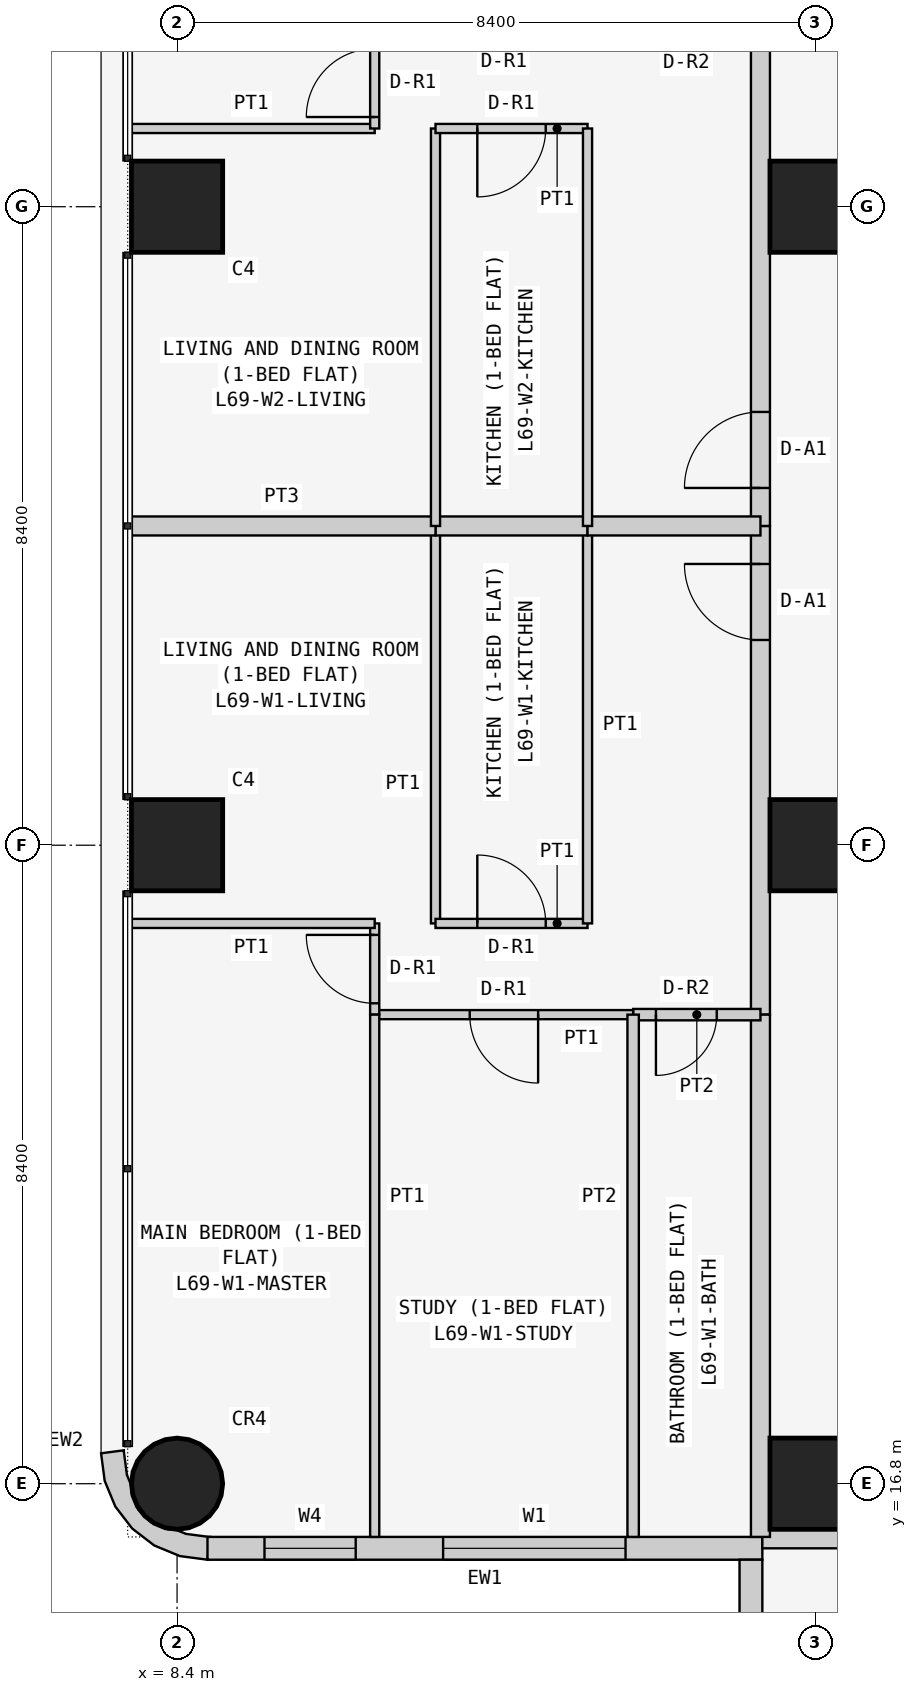
"""IFC4 building model, lengths in metres.
Left out: names, types, materials, properties, quantities, classifications, styles, units other than length and angle.
Written with IfcOpenShell. Run it as: python <this file> out.ifc"""

import sys

from ifc_helpers import new_model, si_unit, direction, frame, frame_2d, origin, origin_2d, place, context, subcontext, project, spatial, polyline, rectangle, circle, outline, extrude, element, fill, save


model = new_model("IFC4")
c1 = context("Model", 3, precision=1e-05, world=origin(), true_north=direction((0.0, 1.0)))
c2 = subcontext(c1, "Body", "Model", "MODEL_VIEW")
j1 = project(units=[si_unit("LENGTHUNIT", "METRE"), si_unit("PLANEANGLEUNIT", "RADIAN")], contexts=[c1])
p1 = place(None, origin())
s1 = spatial("IfcSite", under=j1, at=p1, CompositionType="ELEMENT")
p2 = place(p1, origin())
s2 = spatial("IfcBuilding", under=s1, at=p2, CompositionType="ELEMENT")
p3 = place(p2, frame((0.0, 0.0, 264.9)))
s3 = spatial("IfcBuildingStorey", under=s2, at=p3, CompositionType="ELEMENT", Elevation=264.9)
p4 = place(p3, frame((8.4, 16.8, 0.0), z_axis=(0.0, 0.0, 1.0), x_axis=(1.0, 0.0, 0.0)))
e1 = element("IfcColumn", 1, at=p4, inside=s3, PredefinedType="COLUMN", context=c2, shape_type="SweptSolid", body=[
    extrude(circle(Radius=0.6, at=origin_2d()), origin(), (0.0, 0.0, 1.0), 3.6),
])
for number, where, z_axis, x_axis in (
    (2, (8.4, 25.2, 0.0), (0.0, 0.0, 1.0), (1.0, 0.0, 0.0)),
    (3, (8.4, 33.6, 0.0), (0.0, 0.0, 1.0), (1.0, 0.0, 0.0)),
    (4, (16.8, 16.8, 0.0), (0.0, 0.0, 1.0), (1.0, 0.0, 0.0)),
    (5, (16.8, 25.2, 0.0), (0.0, 0.0, 1.0), (1.0, 0.0, 0.0)),
    (6, (16.8, 33.6, 0.0), (0.0, 0.0, 1.0), (1.0, 0.0, 0.0)),
):
    element("IfcColumn", number, at=place(p3, frame(where, z_axis=z_axis, x_axis=x_axis)), inside=s3, PredefinedType="COLUMN", context=c2, shape_type="SweptSolid", body=[
        extrude(rectangle(XDim=1.2, YDim=1.2, at=origin_2d()), origin(), (0.0, 0.0, 1.0), 3.6),
    ])
p5 = place(p3, frame((8.8, 15.95, 0.0), z_axis=(0.0, 0.0, 1.0), x_axis=(1.0, 0.0, 0.0)))
e7 = element("IfcWall", 7, at=p5, inside=s3, PredefinedType="SOLIDWALL", context=c2, shape_type="SweptSolid", body=[
    extrude(rectangle(XDim=7.3, YDim=0.3, at=frame_2d((3.65, 0.0))), origin(), (0.0, 0.0, 1.0), 3.45),
])
p6 = place(p5, frame((3.1, 0.0, 0.9)))
e8 = element("IfcOpeningElement", 8, at=p6, cuts=e7, PredefinedType="OPENING", context=c2, shape_type="SweptSolid", body=[
    extrude(rectangle(XDim=2.4, YDim=1.5, at=frame_2d((1.2, 0.75))), frame((0.0, 0.16, 0.0), z_axis=(0.0, -1.0, 0.0), x_axis=(1.0, 0.0, 0.0)), (0.0, 0.0, 1.0), 0.32),
])
p7 = place(p5, frame((0.75, 0.0, 0.9)))
e9 = element("IfcOpeningElement", 9, at=p7, cuts=e7, PredefinedType="OPENING", context=c2, shape_type="SweptSolid", body=[
    extrude(rectangle(XDim=1.2, YDim=1.5, at=frame_2d((0.6, 0.75))), frame((0.0, 0.16, 0.0), z_axis=(0.0, -1.0, 0.0), x_axis=(1.0, 0.0, 0.0)), (0.0, 0.0, 1.0), 0.32),
])
p8 = place(p3, frame((15.95, 15.8, 0.0), z_axis=(0.0, 0.0, 1.0), x_axis=(0.0, -1.0, 0.0)))
e10 = element("IfcWall", 10, at=p8, inside=s3, PredefinedType="SOLIDWALL", context=c2, shape_type="SweptSolid", body=[
    extrude(rectangle(XDim=7.0, YDim=0.3, at=frame_2d((3.5, 0.0))), origin(), (0.0, 0.0, 1.0), 3.45),
])
p9 = place(p8, frame((1.5, 0.0, 0.9)))
e11 = element("IfcOpeningElement", 11, at=p9, cuts=e10, PredefinedType="OPENING", context=c2, shape_type="SweptSolid", body=[
    extrude(rectangle(XDim=2.4, YDim=1.5, at=frame_2d((1.2, 0.75))), frame((0.0, 0.16, 0.0), z_axis=(0.0, -1.0, 0.0), x_axis=(1.0, 0.0, 0.0)), (0.0, 0.0, 1.0), 0.32),
])
p10 = place(p8, frame((5.05, 0.0, 0.9)))
e12 = element("IfcOpeningElement", 12, at=p10, cuts=e10, PredefinedType="OPENING", context=c2, shape_type="SweptSolid", body=[
    extrude(rectangle(XDim=1.2, YDim=1.5, at=frame_2d((0.6, 0.75))), frame((0.0, 0.16, 0.0), z_axis=(0.0, -1.0, 0.0), x_axis=(1.0, 0.0, 0.0)), (0.0, 0.0, 1.0), 0.32),
])
p11 = place(p3, frame((7.824, 17.162, 0.0), z_axis=(0.0, 0.0, 1.0), x_axis=(-0.707106781187, -0.707106781187, 0.0)))
e13 = element("IfcWall", 13, at=p11, inside=s3, PredefinedType="SOLIDWALL", context=c2, shape_type="SweptSolid", body=[
    extrude(outline(polyline([(0.047, 1.454), (0.233, 1.212), (0.292, 1.069), (0.358, 1.003), (0.449, 0.782), (0.449, 0.543), (0.358, 0.323), (0.292, 0.257), (0.233, 0.114), (0.047, -0.129), (0.033, -0.143), (0.273, -0.327), (0.495, -0.037), (0.635, 0.301), (0.683, 0.663), (0.635, 1.025), (0.495, 1.363), (0.273, 1.653), (0.033, 1.469), (0.047, 1.454)])), origin(), (0.0, 0.0, 1.0), 3.45),
])
p12 = place(p3, frame((22.571, 16.075, 0.0), z_axis=(0.0, 0.0, 1.0), x_axis=(-1.0, 0.0, 0.0)))
e14 = element("IfcWall", 14, at=p12, inside=s3, PredefinedType="PARTITIONING", context=c2, shape_type="SweptSolid", body=[
    extrude(rectangle(XDim=6.471, YDim=0.25, at=frame_2d((3.235, 0.0))), origin(), (0.0, 0.0, 1.0), 3.45),
])
p13 = place(p3, frame((16.075, 22.971, 0.0), z_axis=(0.0, 0.0, 1.0), x_axis=(0.0, 1.0, 0.0)))
e15 = element("IfcWall", 15, at=p13, inside=s3, PredefinedType="PARTITIONING", context=c2, shape_type="SweptSolid", body=[
    extrude(rectangle(XDim=6.429, YDim=0.25, at=frame_2d((3.214, 0.0))), origin(), (0.0, 0.0, 1.0), 3.45),
])
p14 = place(p13, frame((4.929, 0.0, 0.0)))
e16 = element("IfcOpeningElement", 16, at=p14, cuts=e15, PredefinedType="OPENING", context=c2, shape_type="SweptSolid", body=[
    extrude(rectangle(XDim=1.0, YDim=2.1, at=frame_2d((0.5, 1.05))), frame((0.0, 0.135, 0.0), z_axis=(0.0, -1.0, 0.0), x_axis=(1.0, 0.0, 0.0)), (0.0, 0.0, 1.0), 0.27),
])
p15 = place(p3, frame((16.075, 16.1, 0.0), z_axis=(0.0, 0.0, 1.0), x_axis=(0.0, 1.0, 0.0)))
e17 = element("IfcWall", 17, at=p15, inside=s3, PredefinedType="PARTITIONING", context=c2, shape_type="SweptSolid", body=[
    extrude(rectangle(XDim=6.871, YDim=0.25, at=frame_2d((3.436, 0.0))), origin(), (0.0, 0.0, 1.0), 3.45),
])
p16 = place(p3, frame((16.075, 29.4, 0.0), z_axis=(0.0, 0.0, 1.0), x_axis=(0.0, 1.0, 0.0)))
e18 = element("IfcWall", 18, at=p16, inside=s3, PredefinedType="PARTITIONING", context=c2, shape_type="SweptSolid", body=[
    extrude(rectangle(XDim=6.429, YDim=0.25, at=frame_2d((3.215, 0.0))), origin(), (0.0, 0.0, 1.0), 3.45),
])
p17 = place(p16, frame((0.5, 0.0, 0.0)))
e19 = element("IfcOpeningElement", 19, at=p17, cuts=e18, PredefinedType="OPENING", context=c2, shape_type="SweptSolid", body=[
    extrude(rectangle(XDim=1.0, YDim=2.1, at=frame_2d((0.5, 1.05))), frame((0.0, 0.135, 0.0), z_axis=(0.0, -1.0, 0.0), x_axis=(1.0, 0.0, 0.0)), (0.0, 0.0, 1.0), 0.27),
])
p18 = place(p3, frame((11.8, 29.4, 0.0), z_axis=(0.0, 0.0, 1.0), x_axis=(0.0, -1.0, 0.0)))
e20 = element("IfcWall", 20, at=p18, inside=s3, PredefinedType="PARTITIONING", context=c2, shape_type="SweptSolid", body=[
    extrude(rectangle(XDim=5.229, YDim=0.12, at=frame_2d((2.615, 0.0))), origin(), (0.0, 0.0, 1.0), 3.45),
])
p19 = place(p3, frame((11.8, 24.171, 0.0), z_axis=(0.0, 0.0, 1.0), x_axis=(1.0, 0.0, 0.0)))
e21 = element("IfcWall", 21, at=p19, inside=s3, PredefinedType="PARTITIONING", context=c2, shape_type="SweptSolid", body=[
    extrude(rectangle(XDim=2.0, YDim=0.12, at=frame_2d((1.0, 0.0))), origin(), (0.0, 0.0, 1.0), 3.45),
])
p20 = place(p19, frame((0.55, 0.0, 0.0)))
e22 = element("IfcOpeningElement", 22, at=p20, cuts=e21, PredefinedType="OPENING", context=c2, shape_type="SweptSolid", body=[
    extrude(rectangle(XDim=0.9, YDim=2.1, at=frame_2d((0.45, 1.05))), frame((0.0, 0.07, 0.0), z_axis=(0.0, -1.0, 0.0), x_axis=(1.0, 0.0, 0.0)), (0.0, 0.0, 1.0), 0.14),
])
p21 = place(p3, frame((13.8, 24.171, 0.0), z_axis=(0.0, 0.0, 1.0), x_axis=(0.0, 1.0, 0.0)))
e23 = element("IfcWall", 23, at=p21, inside=s3, PredefinedType="PARTITIONING", context=c2, shape_type="SweptSolid", body=[
    extrude(rectangle(XDim=5.229, YDim=0.12, at=frame_2d((2.615, 0.0))), origin(), (0.0, 0.0, 1.0), 3.45),
])
p22 = place(p3, frame((13.8, 29.4, 0.0), z_axis=(0.0, 0.0, 1.0), x_axis=(-1.0, 0.0, 0.0)))
e24 = element("IfcWall", 24, at=p22, inside=s3, PredefinedType="PARTITIONING", context=c2, shape_type="SweptSolid", body=[
    extrude(rectangle(XDim=2.0, YDim=0.25, at=frame_2d((1.0, 0.0))), origin(), (0.0, 0.0, 1.0), 3.45),
])
p23 = place(p3, frame((16.075, 22.971, 0.0), z_axis=(0.0, 0.0, 1.0), x_axis=(-1.0, 0.0, 0.0)))
e25 = element("IfcWall", 25, at=p23, inside=s3, PredefinedType="PARTITIONING", context=c2, shape_type="SweptSolid", body=[
    extrude(rectangle(XDim=1.675, YDim=0.15, at=frame_2d((0.837, 0.0))), origin(), (0.0, 0.0, 1.0), 3.45),
])
p24 = place(p23, frame((0.575, 0.0, 0.0)))
e26 = element("IfcOpeningElement", 26, at=p24, cuts=e25, PredefinedType="OPENING", context=c2, shape_type="SweptSolid", body=[
    extrude(rectangle(XDim=0.8, YDim=2.1, at=frame_2d((0.4, 1.05))), frame((0.0, 0.085, 0.0), z_axis=(0.0, -1.0, 0.0), x_axis=(1.0, 0.0, 0.0)), (0.0, 0.0, 1.0), 0.17),
])
p25 = place(p3, frame((14.4, 22.971, 0.0), z_axis=(0.0, 0.0, 1.0), x_axis=(-1.0, 0.0, 0.0)))
e27 = element("IfcWall", 27, at=p25, inside=s3, PredefinedType="PARTITIONING", context=c2, shape_type="SweptSolid", body=[
    extrude(rectangle(XDim=3.4, YDim=0.12, at=frame_2d((1.7, 0.0))), origin(), (0.0, 0.0, 1.0), 3.45),
])
p26 = place(p25, frame((1.25, 0.0, 0.0)))
e28 = element("IfcOpeningElement", 28, at=p26, cuts=e27, PredefinedType="OPENING", context=c2, shape_type="SweptSolid", body=[
    extrude(rectangle(XDim=0.9, YDim=2.1, at=frame_2d((0.45, 1.05))), frame((0.0, 0.07, 0.0), z_axis=(0.0, -1.0, 0.0), x_axis=(1.0, 0.0, 0.0)), (0.0, 0.0, 1.0), 0.14),
])
p27 = place(p3, frame((11.0, 22.971, 0.0), z_axis=(0.0, 0.0, 1.0), x_axis=(0.0, 1.0, 0.0)))
e29 = element("IfcWall", 29, at=p27, inside=s3, PredefinedType="PARTITIONING", context=c2, shape_type="SweptSolid", body=[
    extrude(rectangle(XDim=1.2, YDim=0.12, at=frame_2d((0.6, 0.0))), origin(), (0.0, 0.0, 1.0), 3.45),
])
p28 = place(p27, frame((0.149, 0.0, 0.0)))
e30 = element("IfcOpeningElement", 30, at=p28, cuts=e29, PredefinedType="OPENING", context=c2, shape_type="SweptSolid", body=[
    extrude(rectangle(XDim=0.9, YDim=2.1, at=frame_2d((0.45, 1.05))), frame((0.0, 0.07, 0.0), z_axis=(0.0, -1.0, 0.0), x_axis=(1.0, 0.0, 0.0)), (0.0, 0.0, 1.0), 0.14),
])
p29 = place(p3, frame((11.0, 24.171, 0.0), z_axis=(0.0, 0.0, 1.0), x_axis=(-1.0, 0.0, 0.0)))
e31 = element("IfcWall", 31, at=p29, inside=s3, PredefinedType="PARTITIONING", context=c2, shape_type="SweptSolid", body=[
    extrude(rectangle(XDim=3.25, YDim=0.12, at=frame_2d((1.625, 0.0))), origin(), (0.0, 0.0, 1.0), 3.45),
])
p30 = place(p3, frame((7.75, 29.4, 0.0), z_axis=(0.0, 0.0, 1.0), x_axis=(1.0, 0.0, 0.0)))
e32 = element("IfcWall", 32, at=p30, inside=s3, PredefinedType="PARTITIONING", context=c2, shape_type="SweptSolid", body=[
    extrude(rectangle(XDim=4.05, YDim=0.25, at=frame_2d((2.025, 0.0))), origin(), (0.0, 0.0, 1.0), 3.45),
])
p31 = place(p3, frame((13.8, 29.4, 0.0), z_axis=(0.0, 0.0, 1.0), x_axis=(1.0, 0.0, 0.0)))
e33 = element("IfcWall", 33, at=p31, inside=s3, PredefinedType="PARTITIONING", context=c2, shape_type="SweptSolid", body=[
    extrude(rectangle(XDim=2.275, YDim=0.25, at=frame_2d((1.137, 0.0))), origin(), (0.0, 0.0, 1.0), 3.45),
])
p32 = place(p3, frame((14.4, 22.971, 0.0), z_axis=(0.0, 0.0, 1.0), x_axis=(0.0, -1.0, 0.0)))
e34 = element("IfcWall", 34, at=p32, inside=s3, PredefinedType="PARTITIONING", context=c2, shape_type="SweptSolid", body=[
    extrude(rectangle(XDim=6.871, YDim=0.15, at=frame_2d((3.436, 0.0))), origin(), (0.0, 0.0, 1.0), 3.45),
])
p33 = place(p3, frame((11.0, 22.971, 0.0), z_axis=(0.0, 0.0, 1.0), x_axis=(0.0, -1.0, 0.0)))
e35 = element("IfcWall", 35, at=p33, inside=s3, PredefinedType="PARTITIONING", context=c2, shape_type="SweptSolid", body=[
    extrude(rectangle(XDim=6.871, YDim=0.12, at=frame_2d((3.436, 0.0))), origin(), (0.0, 0.0, 1.0), 3.45),
])
p34 = place(p3, frame((11.8, 29.4, 0.0), z_axis=(0.0, 0.0, 1.0), x_axis=(0.0, 1.0, 0.0)))
e36 = element("IfcWall", 36, at=p34, inside=s3, PredefinedType="PARTITIONING", context=c2, shape_type="SweptSolid", body=[
    extrude(rectangle(XDim=5.229, YDim=0.12, at=frame_2d((2.615, 0.0))), origin(), (0.0, 0.0, 1.0), 3.45),
])
p35 = place(p3, frame((11.8, 34.629, 0.0), z_axis=(0.0, 0.0, 1.0), x_axis=(1.0, 0.0, 0.0)))
e37 = element("IfcWall", 37, at=p35, inside=s3, PredefinedType="PARTITIONING", context=c2, shape_type="SweptSolid", body=[
    extrude(rectangle(XDim=2.0, YDim=0.12, at=frame_2d((1.0, 0.0))), origin(), (0.0, 0.0, 1.0), 3.45),
])
p36 = place(p35, frame((0.55, 0.0, 0.0)))
e38 = element("IfcOpeningElement", 38, at=p36, cuts=e37, PredefinedType="OPENING", context=c2, shape_type="SweptSolid", body=[
    extrude(rectangle(XDim=0.9, YDim=2.1, at=frame_2d((0.45, 1.05))), frame((0.0, 0.07, 0.0), z_axis=(0.0, -1.0, 0.0), x_axis=(1.0, 0.0, 0.0)), (0.0, 0.0, 1.0), 0.14),
])
p37 = place(p3, frame((13.8, 34.629, 0.0), z_axis=(0.0, 0.0, 1.0), x_axis=(0.0, -1.0, 0.0)))
e39 = element("IfcWall", 39, at=p37, inside=s3, PredefinedType="PARTITIONING", context=c2, shape_type="SweptSolid", body=[
    extrude(rectangle(XDim=5.229, YDim=0.12, at=frame_2d((2.615, 0.0))), origin(), (0.0, 0.0, 1.0), 3.45),
])
p38 = place(p3, frame((7.75, 34.629, 0.0), z_axis=(0.0, 0.0, 1.0), x_axis=(1.0, 0.0, 0.0)))
e40 = element("IfcWall", 40, at=p38, inside=s3, PredefinedType="PARTITIONING", context=c2, shape_type="SweptSolid", body=[
    extrude(rectangle(XDim=3.25, YDim=0.12, at=frame_2d((1.625, 0.0))), origin(), (0.0, 0.0, 1.0), 3.45),
])
p39 = place(p3, frame((11.0, 34.629, 0.0), z_axis=(0.0, 0.0, 1.0), x_axis=(0.0, 1.0, 0.0)))
e41 = element("IfcWall", 41, at=p39, inside=s3, PredefinedType="PARTITIONING", context=c2, shape_type="SweptSolid", body=[
    extrude(rectangle(XDim=1.2, YDim=0.12, at=frame_2d((0.6, 0.0))), origin(), (0.0, 0.0, 1.0), 3.45),
])
p40 = place(p39, frame((0.151, 0.0, 0.0)))
e42 = element("IfcOpeningElement", 42, at=p40, cuts=e41, PredefinedType="OPENING", context=c2, shape_type="SweptSolid", body=[
    extrude(rectangle(XDim=0.9, YDim=2.1, at=frame_2d((0.45, 1.05))), frame((0.0, 0.07, 0.0), z_axis=(0.0, -1.0, 0.0), x_axis=(1.0, 0.0, 0.0)), (0.0, 0.0, 1.0), 0.14),
])
p41 = place(p6, origin())
e43 = element("IfcWindow", 43, at=p41, inside=s3, PartitioningType="SINGLE_PANEL", PredefinedType="WINDOW", context=c2, shape_type="SweptSolid", body=[
    extrude(rectangle(XDim=2.4, YDim=1.5, at=frame_2d((1.2, 0.75))), frame((0.0, 0.03, 0.0), z_axis=(0.0, -1.0, 0.0), x_axis=(1.0, 0.0, 0.0)), (0.0, 0.0, 1.0), 0.06),
])
fill(e8, e43)
p42 = place(p7, origin())
e44 = element("IfcWindow", 44, at=p42, inside=s3, PartitioningType="SINGLE_PANEL", PredefinedType="WINDOW", context=c2, shape_type="SweptSolid", body=[
    extrude(rectangle(XDim=1.2, YDim=1.5, at=frame_2d((0.6, 0.75))), frame((0.0, 0.03, 0.0), z_axis=(0.0, -1.0, 0.0), x_axis=(1.0, 0.0, 0.0)), (0.0, 0.0, 1.0), 0.06),
])
fill(e9, e44)
p43 = place(p14, origin())
e45 = element("IfcDoor", 45, at=p43, inside=s3, OperationType="SINGLE_SWING_RIGHT", PredefinedType="DOOR", context=c2, shape_type="SweptSolid", body=[
    extrude(rectangle(XDim=1.0, YDim=2.1, at=frame_2d((0.5, 1.05))), frame((0.0, 0.025, 0.0), z_axis=(0.0, -1.0, 0.0), x_axis=(1.0, 0.0, 0.0)), (0.0, 0.0, 1.0), 0.05),
])
fill(e16, e45)
p44 = place(p20, origin())
e46 = element("IfcDoor", 46, at=p44, inside=s3, OperationType="SINGLE_SWING_LEFT", PredefinedType="DOOR", context=c2, shape_type="SweptSolid", body=[
    extrude(rectangle(XDim=0.9, YDim=2.1, at=frame_2d((0.45, 1.05))), frame((0.0, 0.025, 0.0), z_axis=(0.0, -1.0, 0.0), x_axis=(1.0, 0.0, 0.0)), (0.0, 0.0, 1.0), 0.05),
])
fill(e22, e46)
p45 = place(p24, origin())
e47 = element("IfcDoor", 47, at=p45, inside=s3, OperationType="SINGLE_SWING_RIGHT", PredefinedType="DOOR", context=c2, shape_type="SweptSolid", body=[
    extrude(rectangle(XDim=0.8, YDim=2.1, at=frame_2d((0.4, 1.05))), frame((0.0, 0.025, 0.0), z_axis=(0.0, -1.0, 0.0), x_axis=(1.0, 0.0, 0.0)), (0.0, 0.0, 1.0), 0.05),
])
fill(e26, e47)
p46 = place(p26, origin())
e48 = element("IfcDoor", 48, at=p46, inside=s3, OperationType="SINGLE_SWING_LEFT", PredefinedType="DOOR", context=c2, shape_type="SweptSolid", body=[
    extrude(rectangle(XDim=0.9, YDim=2.1, at=frame_2d((0.45, 1.05))), frame((0.0, 0.025, 0.0), z_axis=(0.0, -1.0, 0.0), x_axis=(1.0, 0.0, 0.0)), (0.0, 0.0, 1.0), 0.05),
])
fill(e28, e48)
p47 = place(p28, origin())
e49 = element("IfcDoor", 49, at=p47, inside=s3, OperationType="SINGLE_SWING_RIGHT", PredefinedType="DOOR", context=c2, shape_type="SweptSolid", body=[
    extrude(rectangle(XDim=0.9, YDim=2.1, at=frame_2d((0.45, 1.05))), frame((0.0, 0.025, 0.0), z_axis=(0.0, -1.0, 0.0), x_axis=(1.0, 0.0, 0.0)), (0.0, 0.0, 1.0), 0.05),
])
fill(e30, e49)
p48 = place(p17, origin())
e50 = element("IfcDoor", 50, at=p48, inside=s3, OperationType="SINGLE_SWING_LEFT", PredefinedType="DOOR", context=c2, shape_type="SweptSolid", body=[
    extrude(rectangle(XDim=1.0, YDim=2.1, at=frame_2d((0.5, 1.05))), frame((0.0, 0.025, 0.0), z_axis=(0.0, -1.0, 0.0), x_axis=(1.0, 0.0, 0.0)), (0.0, 0.0, 1.0), 0.05),
])
fill(e19, e50)
p49 = place(p36, frame((0.9, 0.0, 0.0), z_axis=(0.0, 0.0, 1.0), x_axis=(-1.0, 0.0, 0.0)))
e51 = element("IfcDoor", 51, at=p49, inside=s3, OperationType="SINGLE_SWING_RIGHT", PredefinedType="DOOR", context=c2, shape_type="SweptSolid", body=[
    extrude(rectangle(XDim=0.9, YDim=2.1, at=frame_2d((0.45, 1.05))), frame((0.0, 0.025, 0.0), z_axis=(0.0, -1.0, 0.0), x_axis=(1.0, 0.0, 0.0)), (0.0, 0.0, 1.0), 0.05),
])
fill(e38, e51)
p50 = place(p40, origin())
e52 = element("IfcDoor", 52, at=p50, inside=s3, OperationType="SINGLE_SWING_LEFT", PredefinedType="DOOR", context=c2, shape_type="SweptSolid", body=[
    extrude(rectangle(XDim=0.9, YDim=2.1, at=frame_2d((0.45, 1.05))), frame((0.0, 0.025, 0.0), z_axis=(0.0, -1.0, 0.0), x_axis=(1.0, 0.0, 0.0)), (0.0, 0.0, 1.0), 0.05),
])
fill(e42, e52)
save(model, sys.argv[1])
